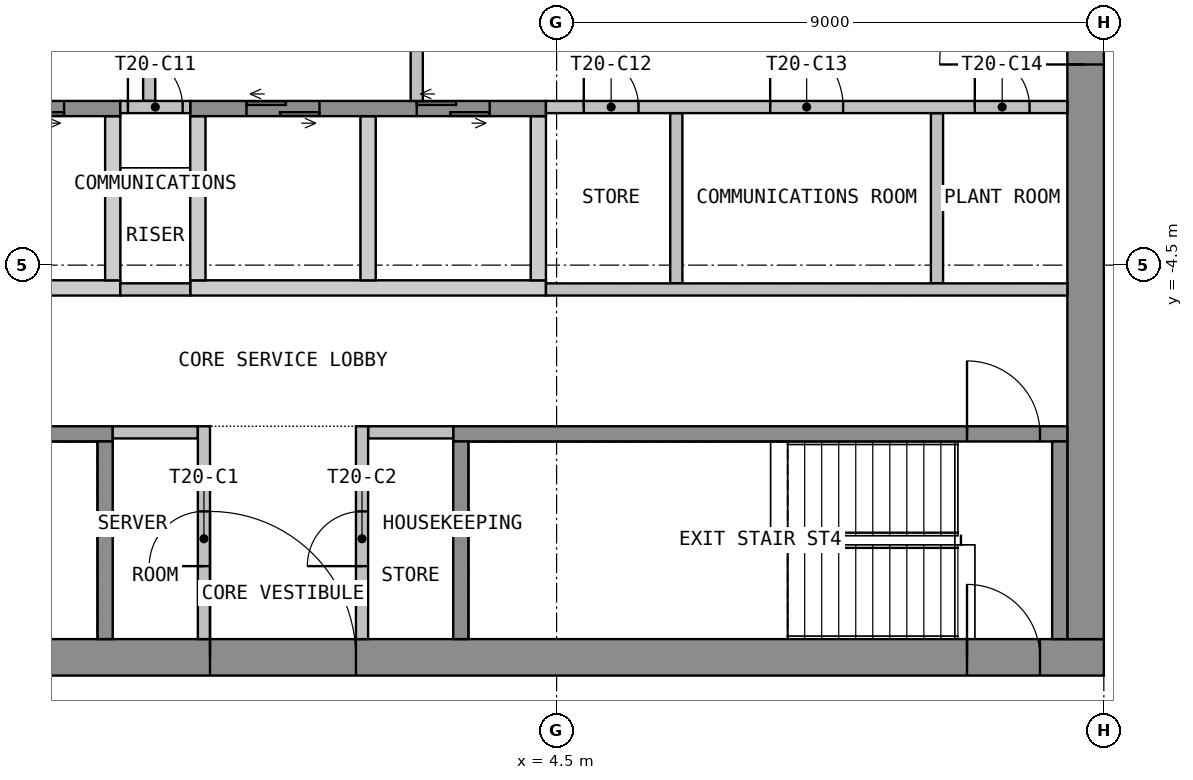
"""IFC4 building model, lengths in metres.
Left out: names, types, materials, properties, quantities, classifications, styles, units other than length and angle.
Written with IfcOpenShell. Run it as: python <this file> out.ifc"""

import sys

from ifc_helpers import new_model, si_unit, direction, frame, frame_2d, origin, place, context, subcontext, project, spatial, polyline, rectangle, outline, extrude, element, fill, save


model = new_model("IFC4")
c1 = context("Model", 3, precision=1e-05, world=origin(), true_north=direction((0.0, 1.0)))
c2 = subcontext(c1, "Body", "Model", "MODEL_VIEW")
j1 = project(units=[si_unit("LENGTHUNIT", "METRE"), si_unit("PLANEANGLEUNIT", "RADIAN")], contexts=[c1])
p1 = place(None, origin())
s1 = spatial("IfcSite", under=j1, at=p1, CompositionType="ELEMENT")
p2 = place(p1, origin())
s2 = spatial("IfcBuilding", under=s1, at=p2, CompositionType="ELEMENT")
p3 = place(p2, frame((0.0, 0.0, 270.3)))
s3 = spatial("IfcBuildingStorey", under=s2, at=p3, CompositionType="ELEMENT", Elevation=270.3)
p4 = place(p3, frame((-13.5, -10.95, 0.0), z_axis=(0.0, 0.0, 1.0), x_axis=(1.0, 0.0, 0.0)))
e1 = element("IfcWall", 1, at=p4, inside=s3, PredefinedType="SHEAR", context=c2, shape_type="SweptSolid", body=[
    extrude(rectangle(XDim=27.0, YDim=0.6, at=frame_2d((13.5, 0.0))), origin(), (0.0, 0.0, 1.0), 3.575),
])
p5 = place(p4, frame((12.3, 0.0, 0.0)))
e2 = element("IfcOpeningElement", 2, at=p5, cuts=e1, PredefinedType="OPENING", context=c2, shape_type="SweptSolid", body=[
    extrude(rectangle(XDim=2.4, YDim=2.1, at=frame_2d((1.2, 1.05))), frame((0.0, 0.31, 0.0), z_axis=(0.0, -1.0, 0.0), x_axis=(1.0, 0.0, 0.0)), (0.0, 0.0, 1.0), 0.62),
])
p6 = place(p4, frame((1.05, 0.0, 0.0)))
e3 = element("IfcOpeningElement", 3, at=p6, cuts=e1, PredefinedType="OPENING", context=c2, shape_type="SweptSolid", body=[
    extrude(rectangle(XDim=1.2, YDim=2.1, at=frame_2d((0.6, 1.05))), frame((0.0, 0.31, 0.0), z_axis=(0.0, -1.0, 0.0), x_axis=(1.0, 0.0, 0.0)), (0.0, 0.0, 1.0), 0.62),
])
p7 = place(p4, frame((24.75, 0.0, 0.0)))
e4 = element("IfcOpeningElement", 4, at=p7, cuts=e1, PredefinedType="OPENING", context=c2, shape_type="SweptSolid", body=[
    extrude(rectangle(XDim=1.2, YDim=2.1, at=frame_2d((0.6, 1.05))), frame((0.0, 0.31, 0.0), z_axis=(0.0, -1.0, 0.0), x_axis=(1.0, 0.0, 0.0)), (0.0, 0.0, 1.0), 0.62),
])
p8 = place(p3, frame((13.2, -10.65, 0.0), z_axis=(0.0, 0.0, 1.0), x_axis=(0.0, 1.0, 0.0)))
e5 = element("IfcWall", 5, at=p8, inside=s3, PredefinedType="SHEAR", context=c2, shape_type="SweptSolid", body=[
    extrude(rectangle(XDim=21.3, YDim=0.6, at=frame_2d((10.65, 0.0))), origin(), (0.0, 0.0, 1.0), 3.575),
])
p9 = place(p8, frame((9.45, 0.0, 0.0)))
e6 = element("IfcOpeningElement", 6, at=p9, cuts=e5, PredefinedType="OPENING", context=c2, shape_type="SweptSolid", body=[
    extrude(rectangle(XDim=2.4, YDim=2.1, at=frame_2d((1.2, 1.05))), frame((0.0, 0.31, 0.0), z_axis=(0.0, -1.0, 0.0), x_axis=(1.0, 0.0, 0.0)), (0.0, 0.0, 1.0), 0.62),
])
p10 = place(p3, origin())
e7 = element("IfcWall", 7, at=p10, inside=s3, PredefinedType="SHEAR", context=c2, shape_type="SweptSolid", body=[
    extrude(outline(polyline([(-11.325, -5.0), (-2.675, -5.0), (-2.675, -4.75), (-11.325, -4.75), (-11.325, -5.0)])), origin(), (0.0, 0.0, 1.0), 3.575),
])
p11 = place(p3, origin())
e8 = element("IfcWall", 8, at=p11, inside=s3, PredefinedType="SHEAR", context=c2, shape_type="SweptSolid", body=[
    extrude(outline(polyline([(-1.525, -5.0), (4.325, -5.0), (4.325, -4.75), (-1.525, -4.75), (-1.525, -5.0)])), origin(), (0.0, 0.0, 1.0), 3.575),
])
p12 = place(p3, origin())
e9 = element("IfcWall", 9, at=p12, inside=s3, PredefinedType="SHEAR", context=c2, shape_type="SweptSolid", body=[
    extrude(outline(polyline([(-2.925, -4.75), (-2.675, -4.75), (-2.675, -2.05), (-2.925, -2.05), (-2.925, -4.75)])), origin(), (0.0, 0.0, 1.0), 3.575),
])
p13 = place(p3, origin())
e10 = element("IfcWall", 10, at=p13, inside=s3, PredefinedType="SHEAR", context=c2, shape_type="SweptSolid", body=[
    extrude(outline(polyline([(-1.525, -4.75), (-1.275, -4.75), (-1.275, -2.05), (-1.525, -2.05), (-1.525, -4.75)])), origin(), (0.0, 0.0, 1.0), 3.575),
])
p14 = place(p3, origin())
e11 = element("IfcWall", 11, at=p14, inside=s3, PredefinedType="SHEAR", context=c2, shape_type="SweptSolid", body=[
    extrude(outline(polyline([(1.275, -4.75), (1.525, -4.75), (1.525, -2.05), (1.275, -2.05), (1.275, -4.75)])), origin(), (0.0, 0.0, 1.0), 3.575),
])
p15 = place(p3, origin())
e12 = element("IfcWall", 12, at=p15, inside=s3, PredefinedType="SHEAR", context=c2, shape_type="SweptSolid", body=[
    extrude(outline(polyline([(4.075, -4.75), (4.325, -4.75), (4.325, -2.05), (4.075, -2.05), (4.075, -4.75)])), origin(), (0.0, 0.0, 1.0), 3.575),
])
p16 = place(p3, frame((-11.325, -1.925, 0.0), z_axis=(0.0, 0.0, 1.0), x_axis=(1.0, 0.0, 0.0)))
e13 = element("IfcWall", 13, at=p16, inside=s3, PredefinedType="SHEAR", context=c2, shape_type="SweptSolid", body=[
    extrude(rectangle(XDim=8.65, YDim=0.25, at=frame_2d((4.325, 0.0))), origin(), (0.0, 0.0, 1.0), 3.575),
])
p17 = place(p16, frame((0.925, 0.0, 0.0)))
e14 = element("IfcOpeningElement", 14, at=p17, cuts=e13, PredefinedType="OPENING", context=c2, shape_type="SweptSolid", body=[
    extrude(rectangle(XDim=1.2, YDim=2.1, at=frame_2d((0.6, 1.05))), frame((0.0, 0.135, 0.0), z_axis=(0.0, -1.0, 0.0), x_axis=(1.0, 0.0, 0.0)), (0.0, 0.0, 1.0), 0.27),
])
p18 = place(p16, frame((3.725, 0.0, 0.0)))
e15 = element("IfcOpeningElement", 15, at=p18, cuts=e13, PredefinedType="OPENING", context=c2, shape_type="SweptSolid", body=[
    extrude(rectangle(XDim=1.2, YDim=2.1, at=frame_2d((0.6, 1.05))), frame((0.0, 0.135, 0.0), z_axis=(0.0, -1.0, 0.0), x_axis=(1.0, 0.0, 0.0)), (0.0, 0.0, 1.0), 0.27),
])
p19 = place(p16, frame((6.525, 0.0, 0.0)))
e16 = element("IfcOpeningElement", 16, at=p19, cuts=e13, PredefinedType="OPENING", context=c2, shape_type="SweptSolid", body=[
    extrude(rectangle(XDim=1.2, YDim=2.1, at=frame_2d((0.6, 1.05))), frame((0.0, 0.135, 0.0), z_axis=(0.0, -1.0, 0.0), x_axis=(1.0, 0.0, 0.0)), (0.0, 0.0, 1.0), 0.27),
])
p20 = place(p3, frame((-1.525, -1.925, 0.0), z_axis=(0.0, 0.0, 1.0), x_axis=(1.0, 0.0, 0.0)))
e17 = element("IfcWall", 17, at=p20, inside=s3, PredefinedType="SHEAR", context=c2, shape_type="SweptSolid", body=[
    extrude(rectangle(XDim=5.85, YDim=0.25, at=frame_2d((2.925, 0.0))), origin(), (0.0, 0.0, 1.0), 3.575),
])
p21 = place(p20, frame((0.925, 0.0, 0.0)))
e18 = element("IfcOpeningElement", 18, at=p21, cuts=e17, PredefinedType="OPENING", context=c2, shape_type="SweptSolid", body=[
    extrude(rectangle(XDim=1.2, YDim=2.1, at=frame_2d((0.6, 1.05))), frame((0.0, 0.135, 0.0), z_axis=(0.0, -1.0, 0.0), x_axis=(1.0, 0.0, 0.0)), (0.0, 0.0, 1.0), 0.27),
])
p22 = place(p20, frame((3.725, 0.0, 0.0)))
e19 = element("IfcOpeningElement", 19, at=p22, cuts=e17, PredefinedType="OPENING", context=c2, shape_type="SweptSolid", body=[
    extrude(rectangle(XDim=1.2, YDim=2.1, at=frame_2d((0.6, 1.05))), frame((0.0, 0.135, 0.0), z_axis=(0.0, -1.0, 0.0), x_axis=(1.0, 0.0, 0.0)), (0.0, 0.0, 1.0), 0.27),
])
p23 = place(p3, frame((-2.2, -1.8, 0.0), z_axis=(0.0, 0.0, 1.0), x_axis=(0.0, 1.0, 0.0)))
e20 = element("IfcWall", 20, at=p23, inside=s3, PredefinedType="PARTITIONING", context=c2, shape_type="SweptSolid", body=[
    extrude(rectangle(XDim=3.6, YDim=0.2, at=frame_2d((1.8, 0.0))), origin(), (0.0, 0.0, 1.0), 3.575),
])
p24 = place(p23, frame((1.2, 0.0, 0.0)))
e21 = element("IfcOpeningElement", 21, at=p24, cuts=e20, PredefinedType="OPENING", context=c2, shape_type="SweptSolid", body=[
    extrude(rectangle(XDim=1.2, YDim=2.1, at=frame_2d((0.6, 1.05))), frame((0.0, 0.11, 0.0), z_axis=(0.0, -1.0, 0.0), x_axis=(1.0, 0.0, 0.0)), (0.0, 0.0, 1.0), 0.22),
])
p25 = place(p3, frame((2.2, -1.8, 0.0), z_axis=(0.0, 0.0, 1.0), x_axis=(0.0, 1.0, 0.0)))
e22 = element("IfcWall", 22, at=p25, inside=s3, PredefinedType="PARTITIONING", context=c2, shape_type="SweptSolid", body=[
    extrude(rectangle(XDim=3.6, YDim=0.2, at=frame_2d((1.8, 0.0))), origin(), (0.0, 0.0, 1.0), 3.575),
])
p26 = place(p25, frame((1.2, 0.0, 0.0)))
e23 = element("IfcOpeningElement", 23, at=p26, cuts=e22, PredefinedType="OPENING", context=c2, shape_type="SweptSolid", body=[
    extrude(rectangle(XDim=1.2, YDim=2.1, at=frame_2d((0.6, 1.05))), frame((0.0, 0.11, 0.0), z_axis=(0.0, -1.0, 0.0), x_axis=(1.0, 0.0, 0.0)), (0.0, 0.0, 1.0), 0.22),
])
p27 = place(p3, frame((-12.9, -7.275, 0.0), z_axis=(0.0, 0.0, 1.0), x_axis=(1.0, 0.0, 0.0)))
e24 = element("IfcWall", 24, at=p27, inside=s3, PredefinedType="SHEAR", context=c2, shape_type="SweptSolid", body=[
    extrude(rectangle(XDim=10.1, YDim=0.25, at=frame_2d((5.05, 0.0))), origin(), (0.0, 0.0, 1.0), 3.575),
])
p28 = place(p27, frame((0.45, 0.0, 0.0)))
e25 = element("IfcOpeningElement", 25, at=p28, cuts=e24, PredefinedType="OPENING", context=c2, shape_type="SweptSolid", body=[
    extrude(rectangle(XDim=1.2, YDim=2.1, at=frame_2d((0.6, 1.05))), frame((0.0, 0.135, 0.0), z_axis=(0.0, -1.0, 0.0), x_axis=(1.0, 0.0, 0.0)), (0.0, 0.0, 1.0), 0.27),
])
p29 = place(p3, frame((-2.925, -10.65, 0.0), z_axis=(0.0, 0.0, 1.0), x_axis=(0.0, 1.0, 0.0)))
e26 = element("IfcWall", 26, at=p29, inside=s3, PredefinedType="SHEAR", context=c2, shape_type="SweptSolid", body=[
    extrude(rectangle(XDim=3.25, YDim=0.25, at=frame_2d((1.625, 0.0))), origin(), (0.0, 0.0, 1.0), 3.575),
])
p30 = place(p3, frame((2.8, -7.275, 0.0), z_axis=(0.0, 0.0, 1.0), x_axis=(1.0, 0.0, 0.0)))
e27 = element("IfcWall", 27, at=p30, inside=s3, PredefinedType="SHEAR", context=c2, shape_type="SweptSolid", body=[
    extrude(rectangle(XDim=10.1, YDim=0.25, at=frame_2d((5.05, 0.0))), origin(), (0.0, 0.0, 1.0), 3.575),
])
p31 = place(p30, frame((8.45, 0.0, 0.0)))
e28 = element("IfcOpeningElement", 28, at=p31, cuts=e27, PredefinedType="OPENING", context=c2, shape_type="SweptSolid", body=[
    extrude(rectangle(XDim=1.2, YDim=2.1, at=frame_2d((0.6, 1.05))), frame((0.0, 0.135, 0.0), z_axis=(0.0, -1.0, 0.0), x_axis=(1.0, 0.0, 0.0)), (0.0, 0.0, 1.0), 0.27),
])
for number, where, z_axis, x_axis in (
    (29, (2.925, -10.65, 0.0), (0.0, 0.0, 1.0), (0.0, 1.0, 0.0)),
    (30, (12.775, -10.65, 0.0), (0.0, 0.0, 1.0), (0.0, 1.0, 0.0)),
):
    element("IfcWall", number, at=place(p3, frame(where, z_axis=z_axis, x_axis=x_axis)), inside=s3, PredefinedType="SHEAR", context=c2, shape_type="SweptSolid", body=[
        extrude(rectangle(XDim=3.25, YDim=0.25, at=frame_2d((1.625, 0.0))), origin(), (0.0, 0.0, 1.0), 3.575),
    ])
for number, where, z_axis, x_axis in (
    (31, (-2.8, -7.25, 0.0), (0.0, 0.0, 1.0), (1.0, 0.0, 0.0)),
    (32, (1.4, -7.25, 0.0), (0.0, 0.0, 1.0), (1.0, 0.0, 0.0)),
):
    element("IfcWall", number, at=place(p3, frame(where, z_axis=z_axis, x_axis=x_axis)), inside=s3, PredefinedType="PARTITIONING", context=c2, shape_type="SweptSolid", body=[
        extrude(rectangle(XDim=1.4, YDim=0.2, at=frame_2d((0.7, 0.0))), origin(), (0.0, 0.0, 1.0), 3.575),
    ])
p32 = place(p3, frame((-1.3, -10.65, 0.0), z_axis=(0.0, 0.0, 1.0), x_axis=(0.0, 1.0, 0.0)))
e33 = element("IfcWall", 33, at=p32, inside=s3, PredefinedType="PARTITIONING", context=c2, shape_type="SweptSolid", body=[
    extrude(rectangle(XDim=3.5, YDim=0.2, at=frame_2d((1.75, 0.0))), origin(), (0.0, 0.0, 1.0), 3.575),
])
p33 = place(p32, frame((1.2, 0.0, 0.0)))
e34 = element("IfcOpeningElement", 34, at=p33, cuts=e33, PredefinedType="OPENING", context=c2, shape_type="SweptSolid", body=[
    extrude(rectangle(XDim=0.9, YDim=2.1, at=frame_2d((0.45, 1.05))), frame((0.0, 0.11, 0.0), z_axis=(0.0, -1.0, 0.0), x_axis=(1.0, 0.0, 0.0)), (0.0, 0.0, 1.0), 0.22),
])
p34 = place(p3, frame((1.3, -10.65, 0.0), z_axis=(0.0, 0.0, 1.0), x_axis=(0.0, 1.0, 0.0)))
e35 = element("IfcWall", 35, at=p34, inside=s3, PredefinedType="PARTITIONING", context=c2, shape_type="SweptSolid", body=[
    extrude(rectangle(XDim=3.5, YDim=0.2, at=frame_2d((1.75, 0.0))), origin(), (0.0, 0.0, 1.0), 3.575),
])
p35 = place(p34, frame((1.2, 0.0, 0.0)))
e36 = element("IfcOpeningElement", 36, at=p35, cuts=e35, PredefinedType="OPENING", context=c2, shape_type="SweptSolid", body=[
    extrude(rectangle(XDim=0.9, YDim=2.1, at=frame_2d((0.45, 1.05))), frame((0.0, 0.11, 0.0), z_axis=(0.0, -1.0, 0.0), x_axis=(1.0, 0.0, 0.0)), (0.0, 0.0, 1.0), 0.22),
])
p36 = place(p3, frame((-2.675, -1.9, 0.0), z_axis=(0.0, 0.0, 1.0), x_axis=(1.0, 0.0, 0.0)))
e37 = element("IfcWall", 37, at=p36, inside=s3, PredefinedType="PARTITIONING", context=c2, shape_type="SweptSolid", body=[
    extrude(rectangle(XDim=1.15, YDim=0.2, at=frame_2d((0.575, 0.0))), origin(), (0.0, 0.0, 1.0), 3.575),
])
p37 = place(p36, frame((0.125, 0.0, 0.0)))
e38 = element("IfcOpeningElement", 38, at=p37, cuts=e37, PredefinedType="OPENING", context=c2, shape_type="SweptSolid", body=[
    extrude(rectangle(XDim=0.9, YDim=2.1, at=frame_2d((0.45, 1.05))), frame((0.0, 0.11, 0.0), z_axis=(0.0, -1.0, 0.0), x_axis=(1.0, 0.0, 0.0)), (0.0, 0.0, 1.0), 0.22),
])
p38 = place(p3, frame((-2.675, -4.9, 0.0), z_axis=(0.0, 0.0, 1.0), x_axis=(1.0, 0.0, 0.0)))
e39 = element("IfcWall", 39, at=p38, inside=s3, PredefinedType="PARTITIONING", context=c2, shape_type="SweptSolid", body=[
    extrude(rectangle(XDim=1.15, YDim=0.2, at=frame_2d((0.575, 0.0))), origin(), (0.0, 0.0, 1.0), 3.575),
])
for number, where, z_axis, x_axis in (
    (40, (6.469, -4.8, 0.0), (0.0, 0.0, 1.0), (0.0, 1.0, 0.0)),
    (41, (10.756, -4.8, 0.0), (0.0, 0.0, 1.0), (0.0, 1.0, 0.0)),
):
    element("IfcWall", number, at=place(p3, frame(where, z_axis=z_axis, x_axis=x_axis)), inside=s3, PredefinedType="PARTITIONING", context=c2, shape_type="SweptSolid", body=[
        extrude(rectangle(XDim=2.8, YDim=0.2, at=frame_2d((1.4, 0.0))), origin(), (0.0, 0.0, 1.0), 3.575),
    ])
p39 = place(p3, frame((4.325, -1.9, 0.0), z_axis=(0.0, 0.0, 1.0), x_axis=(1.0, 0.0, 0.0)))
e42 = element("IfcWall", 42, at=p39, inside=s3, PredefinedType="PARTITIONING", context=c2, shape_type="SweptSolid", body=[
    extrude(rectangle(XDim=8.575, YDim=0.2, at=frame_2d((4.288, 0.0))), origin(), (0.0, 0.0, 1.0), 3.575),
])
p40 = place(p39, frame((0.622, 0.0, 0.0)))
e43 = element("IfcOpeningElement", 43, at=p40, cuts=e42, PredefinedType="OPENING", context=c2, shape_type="SweptSolid", body=[
    extrude(rectangle(XDim=0.9, YDim=2.1, at=frame_2d((0.45, 1.05))), frame((0.0, 0.11, 0.0), z_axis=(0.0, -1.0, 0.0), x_axis=(1.0, 0.0, 0.0)), (0.0, 0.0, 1.0), 0.22),
])
p41 = place(p39, frame((3.688, 0.0, 0.0)))
e44 = element("IfcOpeningElement", 44, at=p41, cuts=e42, PredefinedType="OPENING", context=c2, shape_type="SweptSolid", body=[
    extrude(rectangle(XDim=1.2, YDim=2.1, at=frame_2d((0.6, 1.05))), frame((0.0, 0.11, 0.0), z_axis=(0.0, -1.0, 0.0), x_axis=(1.0, 0.0, 0.0)), (0.0, 0.0, 1.0), 0.22),
])
p42 = place(p39, frame((7.053, 0.0, 0.0)))
e45 = element("IfcOpeningElement", 45, at=p42, cuts=e42, PredefinedType="OPENING", context=c2, shape_type="SweptSolid", body=[
    extrude(rectangle(XDim=0.9, YDim=2.1, at=frame_2d((0.45, 1.05))), frame((0.0, 0.11, 0.0), z_axis=(0.0, -1.0, 0.0), x_axis=(1.0, 0.0, 0.0)), (0.0, 0.0, 1.0), 0.22),
])
p43 = place(p3, frame((4.325, -4.9, 0.0), z_axis=(0.0, 0.0, 1.0), x_axis=(1.0, 0.0, 0.0)))
e46 = element("IfcWall", 46, at=p43, inside=s3, PredefinedType="PARTITIONING", context=c2, shape_type="SweptSolid", body=[
    extrude(rectangle(XDim=8.575, YDim=0.2, at=frame_2d((4.288, 0.0))), origin(), (0.0, 0.0, 1.0), 3.575),
])
p44 = place(p9, origin())
e47 = element("IfcDoor", 47, at=p44, inside=s3, OperationType="DOUBLE_DOOR_DOUBLE_SWING", PredefinedType="DOOR", context=c2, shape_type="SweptSolid", body=[
    extrude(rectangle(XDim=2.4, YDim=2.1, at=frame_2d((1.2, 1.05))), frame((0.0, 0.025, 0.0), z_axis=(0.0, -1.0, 0.0), x_axis=(1.0, 0.0, 0.0)), (0.0, 0.0, 1.0), 0.05),
])
fill(e6, e47)
p45 = place(p5, origin())
e48 = element("IfcDoor", 48, at=p45, inside=s3, OperationType="DOUBLE_DOOR_DOUBLE_SWING", PredefinedType="DOOR", context=c2, shape_type="SweptSolid", body=[
    extrude(rectangle(XDim=2.4, YDim=2.1, at=frame_2d((1.2, 1.05))), frame((0.0, 0.025, 0.0), z_axis=(0.0, -1.0, 0.0), x_axis=(1.0, 0.0, 0.0)), (0.0, 0.0, 1.0), 0.05),
])
fill(e2, e48)
p46 = place(p7, origin())
e49 = element("IfcDoor", 49, at=p46, inside=s3, OperationType="SINGLE_SWING_RIGHT", PredefinedType="DOOR", context=c2, shape_type="SweptSolid", body=[
    extrude(rectangle(XDim=1.2, YDim=2.1, at=frame_2d((0.6, 1.05))), frame((0.0, 0.025, 0.0), z_axis=(0.0, -1.0, 0.0), x_axis=(1.0, 0.0, 0.0)), (0.0, 0.0, 1.0), 0.05),
])
fill(e4, e49)
p47 = place(p19, origin())
e50 = element("IfcDoor", 50, at=p47, inside=s3, OperationType="DOUBLE_DOOR_SLIDING", PredefinedType="DOOR", context=c2, shape_type="SweptSolid", body=[
    extrude(rectangle(XDim=1.2, YDim=2.1, at=frame_2d((0.6, 1.05))), frame((0.0, 0.025, 0.0), z_axis=(0.0, -1.0, 0.0), x_axis=(1.0, 0.0, 0.0)), (0.0, 0.0, 1.0), 0.05),
])
fill(e16, e50)
p48 = place(p21, origin())
e51 = element("IfcDoor", 51, at=p48, inside=s3, OperationType="DOUBLE_DOOR_SLIDING", PredefinedType="DOOR", context=c2, shape_type="SweptSolid", body=[
    extrude(rectangle(XDim=1.2, YDim=2.1, at=frame_2d((0.6, 1.05))), frame((0.0, 0.025, 0.0), z_axis=(0.0, -1.0, 0.0), x_axis=(1.0, 0.0, 0.0)), (0.0, 0.0, 1.0), 0.05),
])
fill(e18, e51)
p49 = place(p22, origin())
e52 = element("IfcDoor", 52, at=p49, inside=s3, OperationType="DOUBLE_DOOR_SLIDING", PredefinedType="DOOR", context=c2, shape_type="SweptSolid", body=[
    extrude(rectangle(XDim=1.2, YDim=2.1, at=frame_2d((0.6, 1.05))), frame((0.0, 0.025, 0.0), z_axis=(0.0, -1.0, 0.0), x_axis=(1.0, 0.0, 0.0)), (0.0, 0.0, 1.0), 0.05),
])
fill(e19, e52)
p50 = place(p31, origin())
e53 = element("IfcDoor", 53, at=p50, inside=s3, OperationType="SINGLE_SWING_LEFT", PredefinedType="DOOR", context=c2, shape_type="SweptSolid", body=[
    extrude(rectangle(XDim=1.2, YDim=2.1, at=frame_2d((0.6, 1.05))), frame((0.0, 0.025, 0.0), z_axis=(0.0, -1.0, 0.0), x_axis=(1.0, 0.0, 0.0)), (0.0, 0.0, 1.0), 0.05),
])
fill(e28, e53)
p51 = place(p33, origin())
e54 = element("IfcDoor", 54, at=p51, inside=s3, OperationType="SINGLE_SWING_LEFT", PredefinedType="DOOR", context=c2, shape_type="SweptSolid", body=[
    extrude(rectangle(XDim=0.9, YDim=2.1, at=frame_2d((0.45, 1.05))), frame((0.0, 0.025, 0.0), z_axis=(0.0, -1.0, 0.0), x_axis=(1.0, 0.0, 0.0)), (0.0, 0.0, 1.0), 0.05),
])
fill(e34, e54)
p52 = place(p35, origin())
e55 = element("IfcDoor", 55, at=p52, inside=s3, OperationType="SINGLE_SWING_LEFT", PredefinedType="DOOR", context=c2, shape_type="SweptSolid", body=[
    extrude(rectangle(XDim=0.9, YDim=2.1, at=frame_2d((0.45, 1.05))), frame((0.0, 0.025, 0.0), z_axis=(0.0, -1.0, 0.0), x_axis=(1.0, 0.0, 0.0)), (0.0, 0.0, 1.0), 0.05),
])
fill(e36, e55)
p53 = place(p37, origin())
e56 = element("IfcDoor", 56, at=p53, inside=s3, OperationType="SINGLE_SWING_LEFT", PredefinedType="DOOR", context=c2, shape_type="SweptSolid", body=[
    extrude(rectangle(XDim=0.9, YDim=2.1, at=frame_2d((0.45, 1.05))), frame((0.0, 0.025, 0.0), z_axis=(0.0, -1.0, 0.0), x_axis=(1.0, 0.0, 0.0)), (0.0, 0.0, 1.0), 0.05),
])
fill(e38, e56)
p54 = place(p40, origin())
e57 = element("IfcDoor", 57, at=p54, inside=s3, OperationType="SINGLE_SWING_LEFT", PredefinedType="DOOR", context=c2, shape_type="SweptSolid", body=[
    extrude(rectangle(XDim=0.9, YDim=2.1, at=frame_2d((0.45, 1.05))), frame((0.0, 0.025, 0.0), z_axis=(0.0, -1.0, 0.0), x_axis=(1.0, 0.0, 0.0)), (0.0, 0.0, 1.0), 0.05),
])
fill(e43, e57)
p55 = place(p41, origin())
e58 = element("IfcDoor", 58, at=p55, inside=s3, OperationType="SINGLE_SWING_RIGHT", PredefinedType="DOOR", context=c2, shape_type="SweptSolid", body=[
    extrude(rectangle(XDim=1.2, YDim=2.1, at=frame_2d((0.6, 1.05))), frame((0.0, 0.025, 0.0), z_axis=(0.0, -1.0, 0.0), x_axis=(1.0, 0.0, 0.0)), (0.0, 0.0, 1.0), 0.05),
])
fill(e44, e58)
p56 = place(p42, origin())
e59 = element("IfcDoor", 59, at=p56, inside=s3, OperationType="SINGLE_SWING_LEFT", PredefinedType="DOOR", context=c2, shape_type="SweptSolid", body=[
    extrude(rectangle(XDim=0.9, YDim=2.1, at=frame_2d((0.45, 1.05))), frame((0.0, 0.025, 0.0), z_axis=(0.0, -1.0, 0.0), x_axis=(1.0, 0.0, 0.0)), (0.0, 0.0, 1.0), 0.05),
])
fill(e45, e59)
save(model, sys.argv[1])
